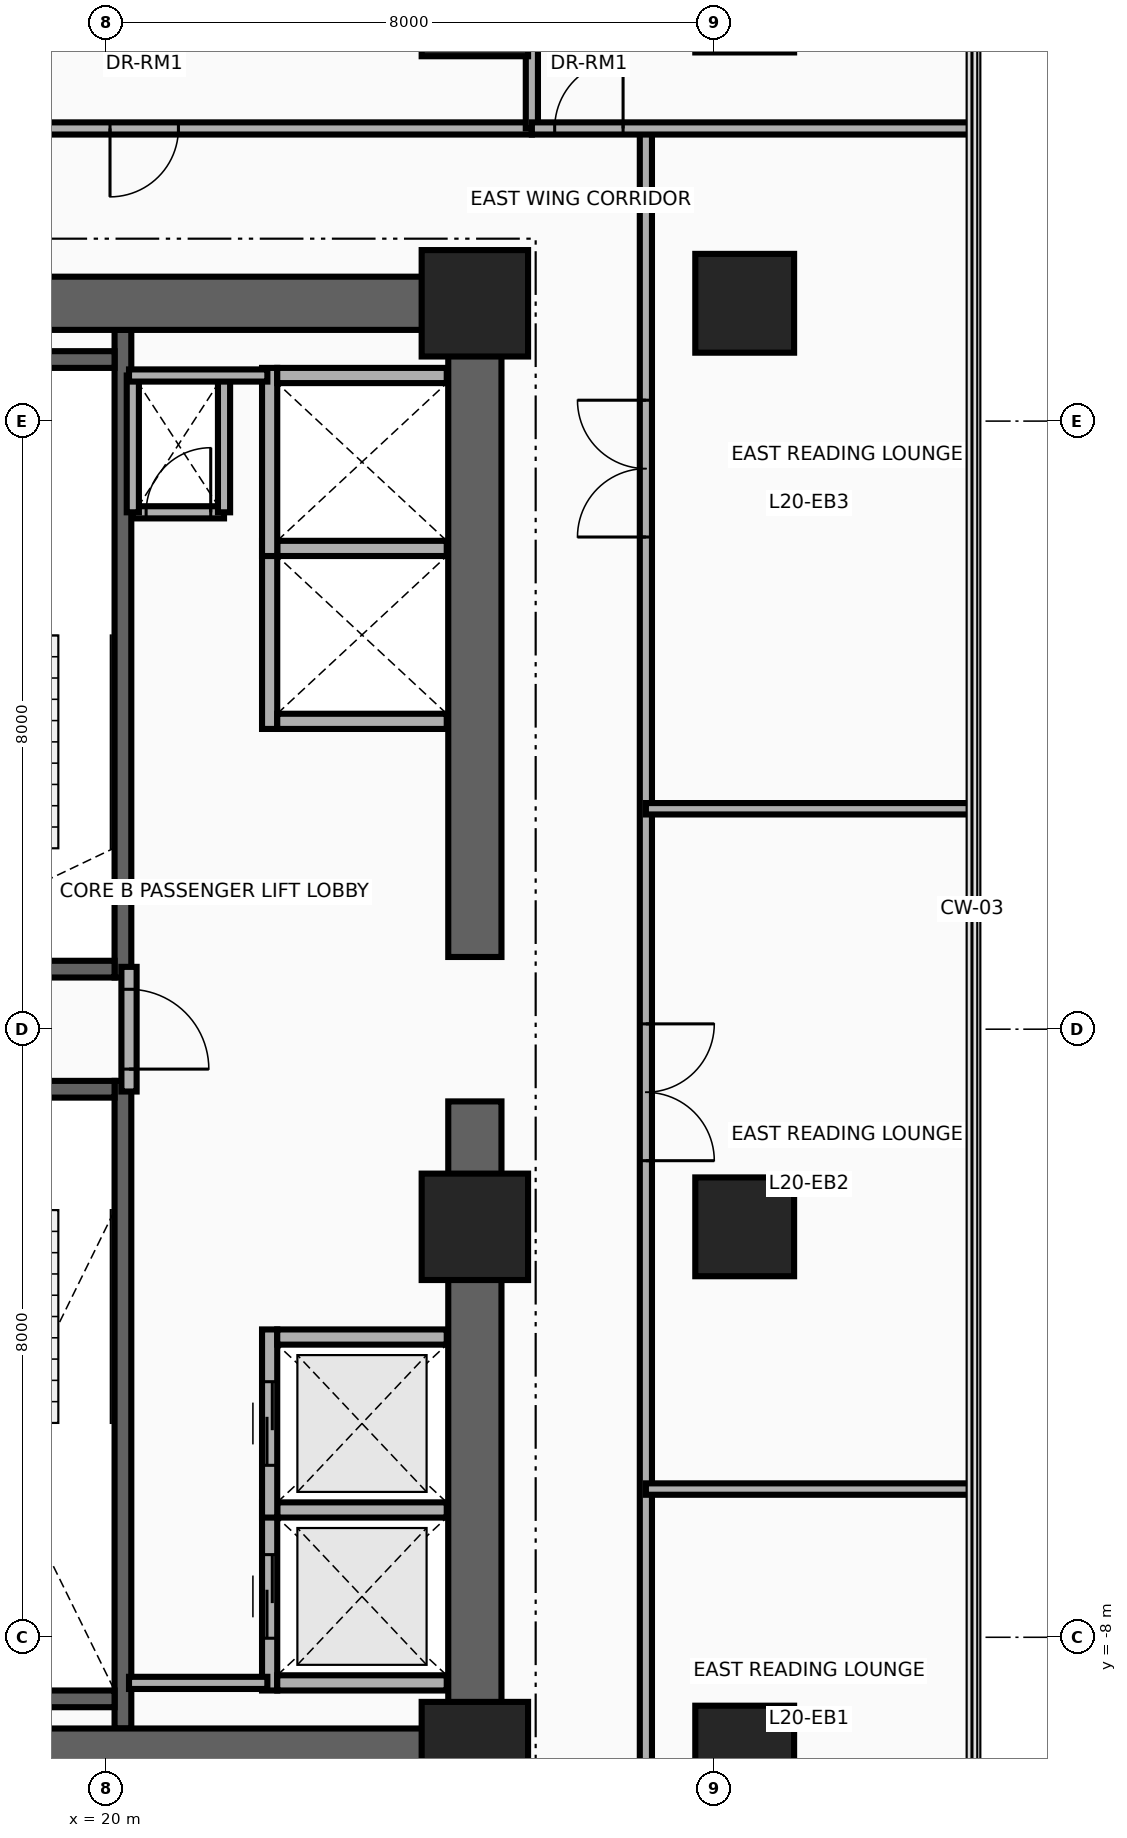
"""IFC4 building model, lengths in metres.
Left out: names, types, materials, properties, quantities, classifications, styles, units other than length and angle.
Written with IfcOpenShell. Run it as: python <this file> out.ifc"""

import sys

from ifc_helpers import new_model, si_unit, direction, frame, frame_2d, origin, origin_2d, place, context, subcontext, project, spatial, rectangle, circle, extrude, source, transform, mapped, element, fill, save


model = new_model("IFC4")
c1 = context("Model", 3, precision=1e-05, world=origin(), true_north=direction((0.0, 1.0)))
c2 = subcontext(c1, "Body", "Model", "MODEL_VIEW")
j1 = project(units=[si_unit("LENGTHUNIT", "METRE"), si_unit("PLANEANGLEUNIT", "RADIAN")], contexts=[c1])
p1 = place(None, origin())
s1 = spatial("IfcSite", under=j1, at=p1, CompositionType="ELEMENT")
p2 = place(p1, origin())
s2 = spatial("IfcBuilding", under=s1, at=p2, CompositionType="ELEMENT")
p3 = place(p2, frame((0.0, 0.0, 81.5)))
s3 = spatial("IfcBuildingStorey", under=s2, at=p3, CompositionType="ELEMENT", Elevation=81.5)
p4 = place(p3, frame((20.22, 0.68, 0.0), z_axis=(0.0, 0.0, 1.0), x_axis=(0.0, 1.0, 0.0)))
e1 = element("IfcWall", 1, at=p4, inside=s3, PredefinedType="SHEAR", context=c2, shape_type="SweptSolid", body=[
    extrude(rectangle(XDim=8.52, YDim=0.22, at=frame_2d((4.26, 0.0))), origin(), (0.0, 0.0, 1.0), 3.46),
])
p5 = place(p3, frame((17.0, 0.79, 0.0), z_axis=(0.0, 0.0, 1.0), x_axis=(1.0, 0.0, 0.0)))
e2 = element("IfcWall", 2, at=p5, inside=s3, PredefinedType="SHEAR", context=c2, shape_type="SweptSolid", body=[
    extrude(rectangle(XDim=3.11, YDim=0.22, at=frame_2d((1.555, 0.0))), origin(), (0.0, 0.0, 1.0), 3.46),
])
p6 = place(p5, frame((0.95, 0.0, 0.0)))
e3 = element("IfcOpeningElement", 3, at=p6, cuts=e2, PredefinedType="OPENING", context=c2, shape_type="SweptSolid", body=[
    extrude(rectangle(XDim=1.1, YDim=2.15, at=frame_2d((0.55, 1.075))), frame((0.0, 0.125, 0.0), z_axis=(0.0, -1.0, 0.0), x_axis=(1.0, 0.0, 0.0)), (0.0, 0.0, 1.0), 0.25),
])
p7 = place(p3, frame((17.0, 8.81, 0.0), z_axis=(0.0, 0.0, 1.0), x_axis=(1.0, 0.0, 0.0)))
e4 = element("IfcWall", 4, at=p7, inside=s3, PredefinedType="SHEAR", context=c2, shape_type="SweptSolid", body=[
    extrude(rectangle(XDim=3.11, YDim=0.22, at=frame_2d((1.555, 0.0))), origin(), (0.0, 0.0, 1.0), 3.46),
])
p8 = place(p3, frame((20.22, -9.2, 0.0), z_axis=(0.0, 0.0, 1.0), x_axis=(0.0, 1.0, 0.0)))
e5 = element("IfcWall", 5, at=p8, inside=s3, PredefinedType="SHEAR", context=c2, shape_type="SweptSolid", body=[
    extrude(rectangle(XDim=8.52, YDim=0.22, at=frame_2d((4.26, 0.0))), origin(), (0.0, 0.0, 1.0), 3.46),
])
p9 = place(p3, frame((17.0, -8.81, 0.0), z_axis=(0.0, 0.0, 1.0), x_axis=(1.0, 0.0, 0.0)))
e6 = element("IfcWall", 6, at=p9, inside=s3, PredefinedType="SHEAR", context=c2, shape_type="SweptSolid", body=[
    extrude(rectangle(XDim=3.11, YDim=0.22, at=frame_2d((1.555, 0.0))), origin(), (0.0, 0.0, 1.0), 3.46),
])
p10 = place(p3, frame((17.0, -0.79, 0.0), z_axis=(0.0, 0.0, 1.0), x_axis=(1.0, 0.0, 0.0)))
e7 = element("IfcWall", 7, at=p10, inside=s3, PredefinedType="SHEAR", context=c2, shape_type="SweptSolid", body=[
    extrude(rectangle(XDim=3.11, YDim=0.22, at=frame_2d((1.555, 0.0))), origin(), (0.0, 0.0, 1.0), 3.46),
])
p11 = place(p10, frame((0.95, 0.0, 0.0)))
e8 = element("IfcOpeningElement", 8, at=p11, cuts=e7, PredefinedType="OPENING", context=c2, shape_type="SweptSolid", body=[
    extrude(rectangle(XDim=1.1, YDim=2.15, at=frame_2d((0.55, 1.075))), frame((0.0, 0.125, 0.0), z_axis=(0.0, -1.0, 0.0), x_axis=(1.0, 0.0, 0.0)), (0.0, 0.0, 1.0), 0.25),
])
for number, where, z_axis, x_axis in (
    (9, (24.85, -9.9, 0.0), (0.0, 0.0, 1.0), (0.0, 1.0, 0.0)),
    (10, (24.85, 0.95, 0.0), (0.0, 0.0, 1.0), (0.0, 1.0, 0.0)),
):
    element("IfcWall", number, at=place(p3, frame(where, z_axis=z_axis, x_axis=x_axis)), inside=s3, PredefinedType="SHEAR", context=c2, shape_type="SweptSolid", body=[
        extrude(rectangle(XDim=8.95, YDim=0.7, at=frame_2d((4.475, 0.0))), origin(), (0.0, 0.0, 1.0), 3.46),
    ])
for number, where, z_axis, x_axis in (
    (11, (15.85, 9.55, 0.0), (0.0, 0.0, 1.0), (1.0, 0.0, 0.0)),
    (12, (15.85, -9.55, 0.0), (0.0, 0.0, 1.0), (1.0, 0.0, 0.0)),
):
    element("IfcWall", number, at=place(p3, frame(where, z_axis=z_axis, x_axis=x_axis)), inside=s3, PredefinedType="SHEAR", context=c2, shape_type="SweptSolid", body=[
        extrude(rectangle(XDim=9.0, YDim=0.7, at=frame_2d((4.5, 0.0))), origin(), (0.0, 0.0, 1.0), 3.46),
    ])
m1 = source(origin(), c2, "Body", "SweptSolid", [
    extrude(rectangle(XDim=1.4, YDim=1.4, at=origin_2d()), origin(), (0.0, 0.0, 1.0), 3.7),
])
p12 = place(p3, frame((24.85, -9.55, 0.0), z_axis=(0.0, 0.0, 1.0), x_axis=(1.0, 0.0, 0.0)))
e13 = element("IfcColumn", 13, at=p12, inside=s3, PredefinedType="COLUMN", context=c2, shape_type="MappedRepresentation", body=[
    mapped(m1, transform((0.0, 0.0, 0.0), x_axis=(1.0, 0.0, 0.0), y_axis=(0.0, 1.0, 0.0), z_axis=(0.0, 0.0, 1.0), scale=1.0)),
])
m2 = source(origin(), c2, "Body", "SweptSolid", [
    extrude(circle(Radius=0.65, at=origin_2d()), origin(), (0.0, 0.0, 1.0), 3.7),
])
p13 = place(p3, frame((28.4, -9.55, 0.0), z_axis=(0.0, 0.0, 1.0), x_axis=(1.0, 0.0, 0.0)))
e14 = element("IfcColumn", 14, at=p13, inside=s3, PredefinedType="COLUMN", context=c2, shape_type="MappedRepresentation", body=[
    mapped(m2, transform((0.0, 0.0, 0.0), x_axis=(1.0, 0.0, 0.0), y_axis=(0.0, 1.0, 0.0), z_axis=(0.0, 0.0, 1.0), scale=1.0)),
])
p14 = place(p3, frame((24.85, -2.6, 0.0), z_axis=(0.0, 0.0, 1.0), x_axis=(1.0, 0.0, 0.0)))
e15 = element("IfcColumn", 15, at=p14, inside=s3, PredefinedType="COLUMN", context=c2, shape_type="MappedRepresentation", body=[
    mapped(m1, transform((0.0, 0.0, 0.0), x_axis=(1.0, 0.0, 0.0), y_axis=(0.0, 1.0, 0.0), z_axis=(0.0, 0.0, 1.0), scale=1.0)),
])
p15 = place(p3, frame((28.4, -2.6, 0.0), z_axis=(0.0, 0.0, 1.0), x_axis=(1.0, 0.0, 0.0)))
e16 = element("IfcColumn", 16, at=p15, inside=s3, PredefinedType="COLUMN", context=c2, shape_type="MappedRepresentation", body=[
    mapped(m2, transform((0.0, 0.0, 0.0), x_axis=(1.0, 0.0, 0.0), y_axis=(0.0, 1.0, 0.0), z_axis=(0.0, 0.0, 1.0), scale=1.0)),
])
p16 = place(p3, frame((24.85, 9.55, 0.0), z_axis=(0.0, 0.0, 1.0), x_axis=(1.0, 0.0, 0.0)))
e17 = element("IfcColumn", 17, at=p16, inside=s3, PredefinedType="COLUMN", context=c2, shape_type="MappedRepresentation", body=[
    mapped(m1, transform((0.0, 0.0, 0.0), x_axis=(1.0, 0.0, 0.0), y_axis=(0.0, 1.0, 0.0), z_axis=(0.0, 0.0, 1.0), scale=1.0)),
])
p17 = place(p3, frame((28.4, 9.55, 0.0), z_axis=(0.0, 0.0, 1.0), x_axis=(1.0, 0.0, 0.0)))
e18 = element("IfcColumn", 18, at=p17, inside=s3, PredefinedType="COLUMN", context=c2, shape_type="MappedRepresentation", body=[
    mapped(m2, transform((0.0, 0.0, 0.0), x_axis=(1.0, 0.0, 0.0), y_axis=(0.0, 1.0, 0.0), z_axis=(0.0, 0.0, 1.0), scale=1.0)),
])
p18 = place(p3, frame((24.85, 13.5, 0.0), z_axis=(0.0, 0.0, 1.0), x_axis=(1.0, 0.0, 0.0)))
e19 = element("IfcColumn", 19, at=p18, inside=s3, PredefinedType="COLUMN", context=c2, shape_type="MappedRepresentation", body=[
    mapped(m1, transform((0.0, 0.0, 0.0), x_axis=(1.0, 0.0, 0.0), y_axis=(0.0, 1.0, 0.0), z_axis=(0.0, 0.0, 1.0), scale=1.0)),
])
p19 = place(p3, frame((22.15, -8.7, 0.0), z_axis=(0.0, 0.0, 1.0), x_axis=(0.0, 1.0, 0.0)))
e20 = element("IfcWall", 20, at=p19, inside=s3, PredefinedType="MOVABLE", context=c2, shape_type="SweptSolid", body=[
    extrude(rectangle(XDim=2.475, YDim=0.2, at=frame_2d((1.237, 0.0))), origin(), (0.0, 0.0, 1.0), 3.46),
])
p20 = place(p19, frame((0.688, 0.0, 0.0)))
e21 = element("IfcOpeningElement", 21, at=p20, cuts=e20, PredefinedType="OPENING", context=c2, shape_type="SweptSolid", body=[
    extrude(rectangle(XDim=1.1, YDim=2.1, at=frame_2d((0.55, 1.05))), frame((0.0, 0.115, 0.0), z_axis=(0.0, -1.0, 0.0), x_axis=(1.0, 0.0, 0.0)), (0.0, 0.0, 1.0), 0.23),
])
for number, where, z_axis, x_axis in (
    (22, (22.25, -8.6, 0.0), (0.0, 0.0, 1.0), (1.0, 0.0, 0.0)),
    (23, (22.25, -6.325, 0.0), (0.0, 0.0, 1.0), (1.0, 0.0, 0.0)),
):
    element("IfcWall", number, at=place(p3, frame(where, z_axis=z_axis, x_axis=x_axis)), inside=s3, PredefinedType="MOVABLE", context=c2, shape_type="SweptSolid", body=[
        extrude(rectangle(XDim=2.23, YDim=0.2, at=frame_2d((1.115, 0.0))), origin(), (0.0, 0.0, 1.0), 3.46),
    ])
p21 = place(p3, frame((22.15, -6.425, 0.0), z_axis=(0.0, 0.0, 1.0), x_axis=(0.0, 1.0, 0.0)))
e24 = element("IfcWall", 24, at=p21, inside=s3, PredefinedType="MOVABLE", context=c2, shape_type="SweptSolid", body=[
    extrude(rectangle(XDim=2.475, YDim=0.2, at=frame_2d((1.238, 0.0))), origin(), (0.0, 0.0, 1.0), 3.46),
])
p22 = place(p21, frame((0.688, 0.0, 0.0)))
e25 = element("IfcOpeningElement", 25, at=p22, cuts=e24, PredefinedType="OPENING", context=c2, shape_type="SweptSolid", body=[
    extrude(rectangle(XDim=1.1, YDim=2.1, at=frame_2d((0.55, 1.05))), frame((0.0, 0.115, 0.0), z_axis=(0.0, -1.0, 0.0), x_axis=(1.0, 0.0, 0.0)), (0.0, 0.0, 1.0), 0.23),
])
p23 = place(p3, frame((22.25, -4.05, 0.0), z_axis=(0.0, 0.0, 1.0), x_axis=(1.0, 0.0, 0.0)))
e26 = element("IfcWall", 26, at=p23, inside=s3, PredefinedType="MOVABLE", context=c2, shape_type="SweptSolid", body=[
    extrude(rectangle(XDim=2.23, YDim=0.2, at=frame_2d((1.115, 0.0))), origin(), (0.0, 0.0, 1.0), 3.46),
])
p24 = place(p3, frame((22.15, 3.95, 0.0), z_axis=(0.0, 0.0, 1.0), x_axis=(0.0, 1.0, 0.0)))
e27 = element("IfcWall", 27, at=p24, inside=s3, PredefinedType="MOVABLE", context=c2, shape_type="SweptSolid", body=[
    extrude(rectangle(XDim=2.475, YDim=0.2, at=frame_2d((1.238, 0.0))), origin(), (0.0, 0.0, 1.0), 3.46),
])
for number, where, z_axis, x_axis in (
    (28, (22.25, 4.05, 0.0), (0.0, 0.0, 1.0), (1.0, 0.0, 0.0)),
    (29, (22.25, 6.325, 0.0), (0.0, 0.0, 1.0), (1.0, 0.0, 0.0)),
):
    element("IfcWall", number, at=place(p3, frame(where, z_axis=z_axis, x_axis=x_axis)), inside=s3, PredefinedType="MOVABLE", context=c2, shape_type="SweptSolid", body=[
        extrude(rectangle(XDim=2.23, YDim=0.2, at=frame_2d((1.115, 0.0))), origin(), (0.0, 0.0, 1.0), 2.245),
    ])
p25 = place(p3, frame((22.15, 6.225, 0.0), z_axis=(0.0, 0.0, 1.0), x_axis=(0.0, 1.0, 0.0)))
e30 = element("IfcWall", 30, at=p25, inside=s3, PredefinedType="MOVABLE", context=c2, shape_type="SweptSolid", body=[
    extrude(rectangle(XDim=2.475, YDim=0.2, at=frame_2d((1.237, 0.0))), origin(), (0.0, 0.0, 1.0), 3.46),
])
p26 = place(p3, frame((22.25, 8.6, 0.0), z_axis=(0.0, 0.0, 1.0), x_axis=(1.0, 0.0, 0.0)))
e31 = element("IfcWall", 31, at=p26, inside=s3, PredefinedType="MOVABLE", context=c2, shape_type="SweptSolid", body=[
    extrude(rectangle(XDim=2.23, YDim=0.2, at=frame_2d((1.115, 0.0))), origin(), (0.0, 0.0, 1.0), 2.245),
])
p27 = place(p3, frame((20.3, -0.82, 0.0), z_axis=(0.0, 0.0, 1.0), x_axis=(0.0, 1.0, 0.0)))
e32 = element("IfcWall", 32, at=p27, inside=s3, PredefinedType="PARTITIONING", context=c2, shape_type="SweptSolid", body=[
    extrude(rectangle(XDim=1.64, YDim=0.2, at=frame_2d((0.82, 0.0))), origin(), (0.0, 0.0, 1.0), 3.46),
])
p28 = place(p27, frame((0.295, 0.0, 0.0)))
e33 = element("IfcOpeningElement", 33, at=p28, cuts=e32, PredefinedType="OPENING", context=c2, shape_type="SweptSolid", body=[
    extrude(rectangle(XDim=1.05, YDim=2.15, at=frame_2d((0.525, 1.075))), frame((0.0, 0.115, 0.0), z_axis=(0.0, -1.0, 0.0), x_axis=(1.0, 0.0, 0.0)), (0.0, 0.0, 1.0), 0.23),
])
p29 = place(p3, frame((20.35, 6.8, 0.0), z_axis=(0.0, 0.0, 1.0), x_axis=(1.0, 0.0, 0.0)))
e34 = element("IfcWall", 34, at=p29, inside=s3, PredefinedType="PARTITIONING", context=c2, shape_type="SweptSolid", body=[
    extrude(rectangle(XDim=1.2, YDim=0.16, at=frame_2d((0.6, 0.0))), origin(), (0.0, 0.0, 1.0), 3.46),
])
p30 = place(p29, frame((0.175, 0.0, 0.0)))
e35 = element("IfcOpeningElement", 35, at=p30, cuts=e34, PredefinedType="OPENING", context=c2, shape_type="SweptSolid", body=[
    extrude(rectangle(XDim=0.85, YDim=2.05, at=frame_2d((0.425, 1.025))), frame((0.0, 0.095, 0.0), z_axis=(0.0, -1.0, 0.0), x_axis=(1.0, 0.0, 0.0)), (0.0, 0.0, 1.0), 0.19),
])
for number, where, z_axis, x_axis in (
    (36, (21.55, 6.8, 0.0), (0.0, 0.0, 1.0), (0.0, 1.0, 0.0)),
    (37, (20.35, 6.8, 0.0), (0.0, 0.0, 1.0), (0.0, 1.0, 0.0)),
):
    element("IfcWall", number, at=place(p3, frame(where, z_axis=z_axis, x_axis=x_axis)), inside=s3, PredefinedType="PARTITIONING", context=c2, shape_type="SweptSolid", body=[
        extrude(rectangle(XDim=1.8, YDim=0.16, at=frame_2d((0.9, 0.0))), origin(), (0.0, 0.0, 1.0), 3.46),
    ])
for number, where, z_axis, x_axis in (
    (38, (20.3, -8.6, 0.0), (0.0, 0.0, 1.0), (1.0, 0.0, 0.0)),
    (39, (20.3, 8.6, 0.0), (0.0, 0.0, 1.0), (1.0, 0.0, 0.0)),
):
    element("IfcWall", number, at=place(p3, frame(where, z_axis=z_axis, x_axis=x_axis)), inside=s3, PredefinedType="PARTITIONING", context=c2, shape_type="SweptSolid", body=[
        extrude(rectangle(XDim=1.82, YDim=0.16, at=frame_2d((0.91, 0.0))), origin(), (0.0, 0.0, 1.0), 3.46),
    ])
p31 = place(p3, frame((15.4, 11.85, 0.0), z_axis=(0.0, 0.0, 1.0), x_axis=(1.0, 0.0, 0.0)))
e40 = element("IfcWall", 40, at=p31, inside=s3, PredefinedType="PARTITIONING", context=c2, shape_type="SweptSolid", body=[
    extrude(rectangle(XDim=10.2, YDim=0.16, at=frame_2d((5.1, 0.0))), origin(), (0.0, 0.0, 1.0), 2.834),
])
p32 = place(p31, frame((4.65, 0.0, 0.0)))
e41 = element("IfcOpeningElement", 41, at=p32, cuts=e40, PredefinedType="OPENING", context=c2, shape_type="SweptSolid", body=[
    extrude(rectangle(XDim=0.9, YDim=2.1, at=frame_2d((0.45, 1.05))), frame((0.0, 0.095, 0.0), z_axis=(0.0, -1.0, 0.0), x_axis=(1.0, 0.0, 0.0)), (0.0, 0.0, 1.0), 0.19),
])
p33 = place(p3, frame((25.6, 11.85, 0.0), z_axis=(0.0, 0.0, 1.0), x_axis=(0.0, 1.0, 0.0)))
e42 = element("IfcWall", 42, at=p33, inside=s3, PredefinedType="PARTITIONING", context=c2, shape_type="SweptSolid", body=[
    extrude(rectangle(XDim=5.898, YDim=0.16, at=frame_2d((2.949, 0.0))), origin(), (0.0, 0.0, 1.0), 2.583),
])
p34 = place(p3, frame((27.1, -13.89, 0.0), z_axis=(0.0, 0.0, 1.0), x_axis=(0.0, 1.0, 0.0)))
e43 = element("IfcWall", 43, at=p34, inside=s3, PredefinedType="PARTITIONING", context=c2, shape_type="SweptSolid", body=[
    extrude(rectangle(XDim=25.74, YDim=0.16, at=frame_2d((12.87, 0.0))), origin(), (0.0, 0.0, 1.0), 2.583),
])
p35 = place(p34, frame((1.76, 0.0, 0.0)))
e44 = element("IfcOpeningElement", 44, at=p35, cuts=e43, PredefinedType="OPENING", context=c2, shape_type="SweptSolid", body=[
    extrude(rectangle(XDim=1.8, YDim=2.15, at=frame_2d((0.9, 1.075))), frame((0.0, 0.095, 0.0), z_axis=(0.0, -1.0, 0.0), x_axis=(1.0, 0.0, 0.0)), (0.0, 0.0, 1.0), 0.19),
])
p36 = place(p34, frame((12.16, 0.0, 0.0)))
e45 = element("IfcOpeningElement", 45, at=p36, cuts=e43, PredefinedType="OPENING", context=c2, shape_type="SweptSolid", body=[
    extrude(rectangle(XDim=1.8, YDim=2.15, at=frame_2d((0.9, 1.075))), frame((0.0, 0.095, 0.0), z_axis=(0.0, -1.0, 0.0), x_axis=(1.0, 0.0, 0.0)), (0.0, 0.0, 1.0), 0.19),
])
p37 = place(p34, frame((20.365, 0.0, 0.0)))
e46 = element("IfcOpeningElement", 46, at=p37, cuts=e43, PredefinedType="OPENING", context=c2, shape_type="SweptSolid", body=[
    extrude(rectangle(XDim=1.8, YDim=2.15, at=frame_2d((0.9, 1.075))), frame((0.0, 0.095, 0.0), z_axis=(0.0, -1.0, 0.0), x_axis=(1.0, 0.0, 0.0)), (0.0, 0.0, 1.0), 0.19),
])
p38 = place(p3, frame((25.6, 11.85, 0.0), z_axis=(0.0, 0.0, 1.0), x_axis=(1.0, 0.0, 0.0)))
e47 = element("IfcWall", 47, at=p38, inside=s3, PredefinedType="PARTITIONING", context=c2, shape_type="SweptSolid", body=[
    extrude(rectangle(XDim=5.79, YDim=0.16, at=frame_2d((2.895, 0.0))), origin(), (0.0, 0.0, 1.0), 2.896),
])
p39 = place(p38, frame((0.3, 0.0, 0.0)))
e48 = element("IfcOpeningElement", 48, at=p39, cuts=e47, PredefinedType="OPENING", context=c2, shape_type="SweptSolid", body=[
    extrude(rectangle(XDim=0.9, YDim=2.1, at=frame_2d((0.45, 1.05))), frame((0.0, 0.095, 0.0), z_axis=(0.0, -1.0, 0.0), x_axis=(1.0, 0.0, 0.0)), (0.0, 0.0, 1.0), 0.19),
])
for number, where, z_axis, x_axis in (
    (49, (27.1, -6.05, 0.0), (0.0, 0.0, 1.0), (1.0, 0.0, 0.0)),
    (50, (27.1, 2.9, 0.0), (0.0, 0.0, 1.0), (1.0, 0.0, 0.0)),
):
    element("IfcWall", number, at=place(p3, frame(where, z_axis=z_axis, x_axis=x_axis)), inside=s3, PredefinedType="PARTITIONING", context=c2, shape_type="SweptSolid", body=[
        extrude(rectangle(XDim=4.29, YDim=0.15, at=frame_2d((2.145, 0.0))), origin(), (0.0, 0.0, 1.0), 2.896),
    ])
p40 = place(p20, origin())
e51 = element("IfcDoor", 51, at=p40, inside=s3, OperationType="DOUBLE_DOOR_SLIDING", PredefinedType="DOOR", context=c2, shape_type="SweptSolid", body=[
    extrude(rectangle(XDim=1.1, YDim=2.1, at=frame_2d((0.55, 1.05))), frame((0.0, 0.025, 0.0), z_axis=(0.0, -1.0, 0.0), x_axis=(1.0, 0.0, 0.0)), (0.0, 0.0, 1.0), 0.05),
])
fill(e21, e51)
p41 = place(p22, origin())
e52 = element("IfcDoor", 52, at=p41, inside=s3, OperationType="DOUBLE_DOOR_SLIDING", PredefinedType="DOOR", context=c2, shape_type="SweptSolid", body=[
    extrude(rectangle(XDim=1.1, YDim=2.1, at=frame_2d((0.55, 1.05))), frame((0.0, 0.025, 0.0), z_axis=(0.0, -1.0, 0.0), x_axis=(1.0, 0.0, 0.0)), (0.0, 0.0, 1.0), 0.05),
])
fill(e25, e52)
p42 = place(p28, frame((1.05, 0.0, 0.0), z_axis=(0.0, 0.0, 1.0), x_axis=(-1.0, 0.0, 0.0)))
e53 = element("IfcDoor", 53, at=p42, inside=s3, OperationType="SINGLE_SWING_LEFT", PredefinedType="DOOR", context=c2, shape_type="SweptSolid", body=[
    extrude(rectangle(XDim=1.05, YDim=2.15, at=frame_2d((0.525, 1.075))), frame((0.0, 0.025, 0.0), z_axis=(0.0, -1.0, 0.0), x_axis=(1.0, 0.0, 0.0)), (0.0, 0.0, 1.0), 0.05),
])
fill(e33, e53)
p43 = place(p30, origin())
e54 = element("IfcDoor", 54, at=p43, inside=s3, OperationType="SINGLE_SWING_RIGHT", PredefinedType="DOOR", context=c2, shape_type="SweptSolid", body=[
    extrude(rectangle(XDim=0.85, YDim=2.05, at=frame_2d((0.425, 1.025))), frame((0.0, 0.025, 0.0), z_axis=(0.0, -1.0, 0.0), x_axis=(1.0, 0.0, 0.0)), (0.0, 0.0, 1.0), 0.05),
])
fill(e35, e54)
p44 = place(p32, frame((0.9, 0.0, 0.0), z_axis=(0.0, 0.0, 1.0), x_axis=(-1.0, 0.0, 0.0)))
e55 = element("IfcDoor", 55, at=p44, inside=s3, OperationType="SINGLE_SWING_LEFT", PredefinedType="DOOR", context=c2, shape_type="SweptSolid", body=[
    extrude(rectangle(XDim=0.9, YDim=2.1, at=frame_2d((0.45, 1.05))), frame((0.0, 0.025, 0.0), z_axis=(0.0, -1.0, 0.0), x_axis=(1.0, 0.0, 0.0)), (0.0, 0.0, 1.0), 0.05),
])
fill(e41, e55)
p45 = place(p39, origin())
e56 = element("IfcDoor", 56, at=p45, inside=s3, OperationType="SINGLE_SWING_LEFT", PredefinedType="DOOR", context=c2, shape_type="SweptSolid", body=[
    extrude(rectangle(XDim=0.9, YDim=2.1, at=frame_2d((0.45, 1.05))), frame((0.0, 0.025, 0.0), z_axis=(0.0, -1.0, 0.0), x_axis=(1.0, 0.0, 0.0)), (0.0, 0.0, 1.0), 0.05),
])
fill(e48, e56)
p46 = place(p36, frame((1.8, 0.0, 0.0), z_axis=(0.0, 0.0, 1.0), x_axis=(-1.0, 0.0, 0.0)))
e57 = element("IfcDoor", 57, at=p46, inside=s3, OperationType="DOUBLE_DOOR_SINGLE_SWING", PredefinedType="DOOR", context=c2, shape_type="SweptSolid", body=[
    extrude(rectangle(XDim=1.8, YDim=2.15, at=frame_2d((0.9, 1.075))), frame((0.0, 0.025, 0.0), z_axis=(0.0, -1.0, 0.0), x_axis=(1.0, 0.0, 0.0)), (0.0, 0.0, 1.0), 0.05),
])
fill(e45, e57)
p47 = place(p37, origin())
e58 = element("IfcDoor", 58, at=p47, inside=s3, OperationType="DOUBLE_DOOR_SINGLE_SWING", PredefinedType="DOOR", context=c2, shape_type="SweptSolid", body=[
    extrude(rectangle(XDim=1.8, YDim=2.15, at=frame_2d((0.9, 1.075))), frame((0.0, 0.025, 0.0), z_axis=(0.0, -1.0, 0.0), x_axis=(1.0, 0.0, 0.0)), (0.0, 0.0, 1.0), 0.05),
])
fill(e46, e58)
save(model, sys.argv[1])
